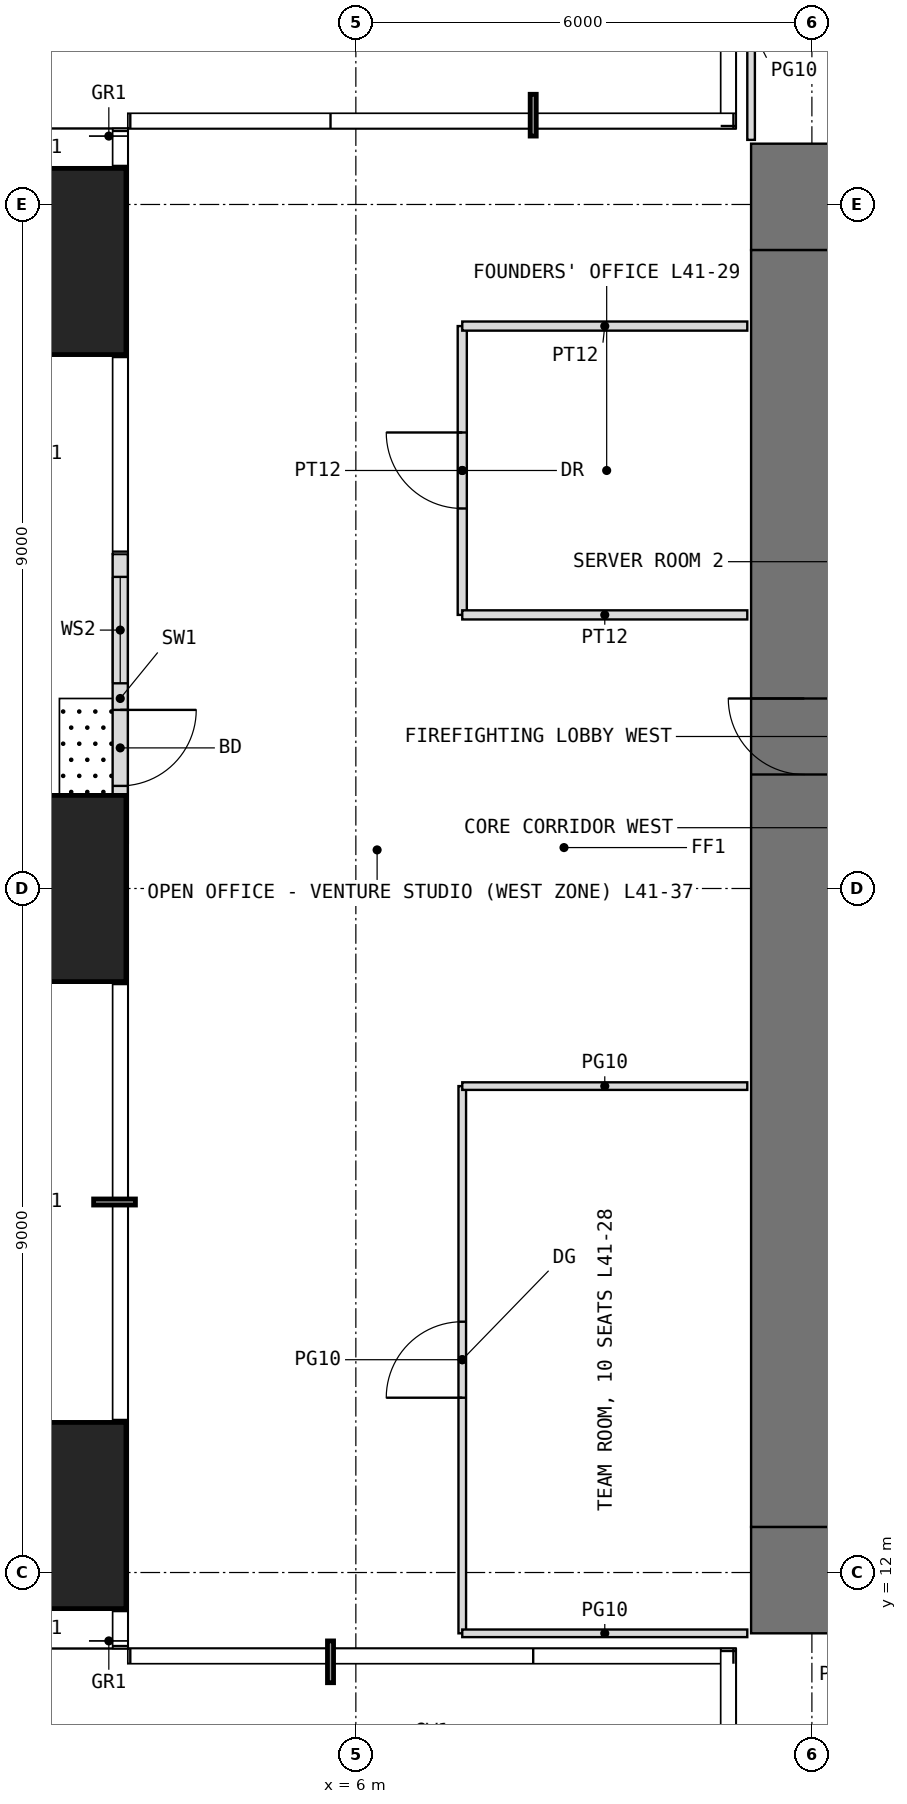
"""IFC4 building model, lengths in metres.
Left out: names, types, materials, properties, quantities, classifications, styles, units other than length and angle.
Written with IfcOpenShell. Run it as: python <this file> out.ifc"""

import sys

from ifc_helpers import new_model, si_unit, direction, frame, frame_2d, origin, origin_2d, place, context, subcontext, project, spatial, rectangle, extrude, element, fill, save


model = new_model("IFC4")
c1 = context("Model", 3, precision=1e-05, world=origin(), true_north=direction((0.0, 1.0)))
c2 = subcontext(c1, "Body", "Model", "MODEL_VIEW")
j1 = project(units=[si_unit("LENGTHUNIT", "METRE"), si_unit("PLANEANGLEUNIT", "RADIAN")], contexts=[c1])
p1 = place(None, origin())
s1 = spatial("IfcSite", under=j1, at=p1, CompositionType="ELEMENT")
p2 = place(p1, origin())
s2 = spatial("IfcBuilding", under=s1, at=p2, CompositionType="ELEMENT")
p3 = place(p2, frame((0.0, 0.0, 174.5)))
s3 = spatial("IfcBuildingStorey", under=s2, at=p3, CompositionType="ELEMENT", Elevation=174.5)
for number, where, z_axis, x_axis in (
    (1, (1.75, 12.75, 0.0), (0.0, 0.0, 1.0), (1.0, 0.0, 0.0)),
    (2, (1.75, 21.0, 0.0), (0.0, 0.0, 1.0), (1.0, 0.0, 0.0)),
    (3, (1.75, 29.25, 0.0), (0.0, 0.0, 1.0), (1.0, 0.0, 0.0)),
):
    element("IfcColumn", number, at=place(p3, frame(where, z_axis=z_axis, x_axis=x_axis)), inside=s3, PredefinedType="COLUMN", context=c2, shape_type="SweptSolid", body=[
        extrude(rectangle(XDim=2.45, YDim=2.45, at=origin_2d()), origin(), (0.0, 0.0, 1.0), 4.0),
    ])
p4 = place(p3, frame((2.9, 25.4, 0.0), z_axis=(0.0, 0.0, 1.0), x_axis=(0.0, -1.0, 0.0)))
e4 = element("IfcWall", 4, at=p4, inside=s3, PredefinedType="USERDEFINED", context=c2, shape_type="SweptSolid", body=[
    extrude(rectangle(XDim=3.8, YDim=0.2, at=frame_2d((1.9, 0.0))), origin(), (0.0, 0.0, 1.0), 3.75),
])
p5 = place(p4, frame((2.05, 0.0, 0.0)))
e5 = element("IfcOpeningElement", 5, at=p5, cuts=e4, PredefinedType="OPENING", context=c2, shape_type="SweptSolid", body=[
    extrude(rectangle(XDim=1.0, YDim=2.4, at=frame_2d((0.5, 1.2))), frame((0.0, 0.11, 0.0), z_axis=(0.0, -1.0, 0.0), x_axis=(1.0, 0.0, 0.0)), (0.0, 0.0, 1.0), 0.22),
])
p6 = place(p4, frame((0.3, 0.0, 0.3)))
e6 = element("IfcOpeningElement", 6, at=p6, cuts=e4, PredefinedType="OPENING", context=c2, shape_type="SweptSolid", body=[
    extrude(rectangle(XDim=1.4, YDim=2.7, at=frame_2d((0.7, 1.35))), frame((0.0, 0.11, 0.0), z_axis=(0.0, -1.0, 0.0), x_axis=(1.0, 0.0, 0.0)), (0.0, 0.0, 1.0), 0.22),
])
p7 = place(p3, frame((11.2, 11.9, -0.05), z_axis=(0.0, 0.0, 1.0), x_axis=(1.0, 0.0, 0.0)))
e7 = element("IfcWall", 7, at=p7, inside=s3, PredefinedType="SHEAR", context=c2, shape_type="SweptSolid", body=[
    extrude(rectangle(XDim=19.6, YDim=1.4, at=frame_2d((9.8, 0.0))), origin(), (0.0, 0.0, 1.0), 4.0),
])
p8 = place(p7, frame((8.8, 0.0, 0.05)))
e8 = element("IfcOpeningElement", 8, at=p8, cuts=e7, PredefinedType="OPENING", context=c2, shape_type="SweptSolid", body=[
    extrude(rectangle(XDim=2.0, YDim=2.2, at=frame_2d((1.0, 1.1))), frame((0.0, 0.71, 0.0), z_axis=(0.0, -1.0, 0.0), x_axis=(1.0, 0.0, 0.0)), (0.0, 0.0, 1.0), 1.42),
])
p9 = place(p3, frame((11.2, 30.1, -0.05), z_axis=(0.0, 0.0, 1.0), x_axis=(1.0, 0.0, 0.0)))
e9 = element("IfcWall", 9, at=p9, inside=s3, PredefinedType="SHEAR", context=c2, shape_type="SweptSolid", body=[
    extrude(rectangle(XDim=19.6, YDim=1.4, at=frame_2d((9.8, 0.0))), origin(), (0.0, 0.0, 1.0), 4.0),
])
p10 = place(p9, frame((8.8, 0.0, 0.05)))
e10 = element("IfcOpeningElement", 10, at=p10, cuts=e9, PredefinedType="OPENING", context=c2, shape_type="SweptSolid", body=[
    extrude(rectangle(XDim=2.0, YDim=2.2, at=frame_2d((1.0, 1.1))), frame((0.0, 0.71, 0.0), z_axis=(0.0, -1.0, 0.0), x_axis=(1.0, 0.0, 0.0)), (0.0, 0.0, 1.0), 1.42),
])
p11 = place(p3, frame((11.9, 12.6, -0.05), z_axis=(0.0, 0.0, 1.0), x_axis=(0.0, 1.0, 0.0)))
e11 = element("IfcWall", 11, at=p11, inside=s3, PredefinedType="SHEAR", context=c2, shape_type="SweptSolid", body=[
    extrude(rectangle(XDim=16.8, YDim=1.4, at=frame_2d((8.4, 0.0))), origin(), (0.0, 0.0, 1.0), 4.0),
])
p12 = place(p11, frame((9.9, 0.0, 0.05)))
e12 = element("IfcOpeningElement", 12, at=p12, cuts=e11, PredefinedType="OPENING", context=c2, shape_type="SweptSolid", body=[
    extrude(rectangle(XDim=1.0, YDim=2.2, at=frame_2d((0.5, 1.1))), frame((0.0, 0.71, 0.0), z_axis=(0.0, -1.0, 0.0), x_axis=(1.0, 0.0, 0.0)), (0.0, 0.0, 1.0), 1.42),
])
p13 = place(p3, frame((7.4, 11.2, 0.0), z_axis=(0.0, 0.0, 1.0), x_axis=(0.0, 1.0, 0.0)))
e13 = element("IfcWall", 13, at=p13, inside=s3, PredefinedType="PARTITIONING", context=c2, shape_type="SweptSolid", body=[
    extrude(rectangle(XDim=7.2, YDim=0.1, at=frame_2d((3.6, 0.0))), origin(), (0.0, 0.0, 1.0), 3.75),
])
p14 = place(p13, frame((3.1, 0.0, 0.0)))
e14 = element("IfcOpeningElement", 14, at=p14, cuts=e13, PredefinedType="OPENING", context=c2, shape_type="SweptSolid", body=[
    extrude(rectangle(XDim=1.0, YDim=2.4, at=frame_2d((0.5, 1.2))), frame((0.0, 0.06, 0.0), z_axis=(0.0, -1.0, 0.0), x_axis=(1.0, 0.0, 0.0)), (0.0, 0.0, 1.0), 0.12),
])
for number, where, z_axis, x_axis in (
    (15, (7.4, 11.2, 0.0), (0.0, 0.0, 1.0), (1.0, 0.0, 0.0)),
    (16, (7.4, 18.4, 0.0), (0.0, 0.0, 1.0), (1.0, 0.0, 0.0)),
):
    element("IfcWall", number, at=place(p3, frame(where, z_axis=z_axis, x_axis=x_axis)), inside=s3, PredefinedType="PARTITIONING", context=c2, shape_type="SweptSolid", body=[
        extrude(rectangle(XDim=3.75, YDim=0.1, at=frame_2d((1.875, 0.0))), origin(), (0.0, 0.0, 1.0), 3.75),
    ])
p15 = place(p3, frame((7.4, 24.6, 0.0), z_axis=(0.0, 0.0, 1.0), x_axis=(0.0, 1.0, 0.0)))
e17 = element("IfcWall", 17, at=p15, inside=s3, PredefinedType="PARTITIONING", context=c2, shape_type="SweptSolid", body=[
    extrude(rectangle(XDim=3.8, YDim=0.12, at=frame_2d((1.9, 0.0))), origin(), (0.0, 0.0, 1.0), 3.75),
])
p16 = place(p15, frame((1.4, 0.0, 0.0)))
e18 = element("IfcOpeningElement", 18, at=p16, cuts=e17, PredefinedType="OPENING", context=c2, shape_type="SweptSolid", body=[
    extrude(rectangle(XDim=1.0, YDim=2.2, at=frame_2d((0.5, 1.1))), frame((0.0, 0.07, 0.0), z_axis=(0.0, -1.0, 0.0), x_axis=(1.0, 0.0, 0.0)), (0.0, 0.0, 1.0), 0.14),
])
for number, where, z_axis, x_axis in (
    (19, (7.4, 24.6, 0.0), (0.0, 0.0, 1.0), (1.0, 0.0, 0.0)),
    (20, (7.4, 28.4, 0.0), (0.0, 0.0, 1.0), (1.0, 0.0, 0.0)),
):
    element("IfcWall", number, at=place(p3, frame(where, z_axis=z_axis, x_axis=x_axis)), inside=s3, PredefinedType="PARTITIONING", context=c2, shape_type="SweptSolid", body=[
        extrude(rectangle(XDim=3.75, YDim=0.12, at=frame_2d((1.875, 0.0))), origin(), (0.0, 0.0, 1.0), 3.75),
    ])
p17 = place(p3, frame((11.2, 30.85, 0.0), z_axis=(0.0, 0.0, 1.0), x_axis=(0.0, 1.0, 0.0)))
e21 = element("IfcWall", 21, at=p17, inside=s3, PredefinedType="PARTITIONING", context=c2, shape_type="SweptSolid", body=[
    extrude(rectangle(XDim=2.95, YDim=0.1, at=frame_2d((1.475, 0.0))), origin(), (0.0, 0.0, 1.0), 3.75),
])
p18 = place(p5, origin())
e22 = element("IfcDoor", 22, at=p18, inside=s3, OperationType="SINGLE_SWING_LEFT", PredefinedType="DOOR", context=c2, shape_type="SweptSolid", body=[
    extrude(rectangle(XDim=1.0, YDim=2.4, at=frame_2d((0.5, 1.2))), frame((0.0, 0.025, 0.0), z_axis=(0.0, -1.0, 0.0), x_axis=(1.0, 0.0, 0.0)), (0.0, 0.0, 1.0), 0.05),
])
fill(e5, e22)
p19 = place(p6, origin())
e23 = element("IfcWindow", 23, at=p19, inside=s3, PartitioningType="SINGLE_PANEL", PredefinedType="WINDOW", context=c2, shape_type="SweptSolid", body=[
    extrude(rectangle(XDim=1.4, YDim=2.7, at=frame_2d((0.7, 1.35))), frame((0.0, 0.03, 0.0), z_axis=(0.0, -1.0, 0.0), x_axis=(1.0, 0.0, 0.0)), (0.0, 0.0, 1.0), 0.06),
])
fill(e6, e23)
p20 = place(p12, origin())
e24 = element("IfcDoor", 24, at=p20, inside=s3, OperationType="SINGLE_SWING_RIGHT", PredefinedType="DOOR", context=c2, shape_type="SweptSolid", body=[
    extrude(rectangle(XDim=1.0, YDim=2.2, at=frame_2d((0.5, 1.1))), frame((0.0, 0.025, 0.0), z_axis=(0.0, -1.0, 0.0), x_axis=(1.0, 0.0, 0.0)), (0.0, 0.0, 1.0), 0.05),
])
fill(e12, e24)
p21 = place(p14, origin())
e25 = element("IfcDoor", 25, at=p21, inside=s3, OperationType="SINGLE_SWING_LEFT", PredefinedType="DOOR", context=c2, shape_type="SweptSolid", body=[
    extrude(rectangle(XDim=1.0, YDim=2.4, at=frame_2d((0.5, 1.2))), frame((0.0, 0.025, 0.0), z_axis=(0.0, -1.0, 0.0), x_axis=(1.0, 0.0, 0.0)), (0.0, 0.0, 1.0), 0.05),
])
fill(e14, e25)
p22 = place(p16, origin())
e26 = element("IfcDoor", 26, at=p22, inside=s3, OperationType="SINGLE_SWING_RIGHT", PredefinedType="DOOR", context=c2, shape_type="SweptSolid", body=[
    extrude(rectangle(XDim=1.0, YDim=2.2, at=frame_2d((0.5, 1.1))), frame((0.0, 0.025, 0.0), z_axis=(0.0, -1.0, 0.0), x_axis=(1.0, 0.0, 0.0)), (0.0, 0.0, 1.0), 0.05),
])
fill(e18, e26)
save(model, sys.argv[1])
